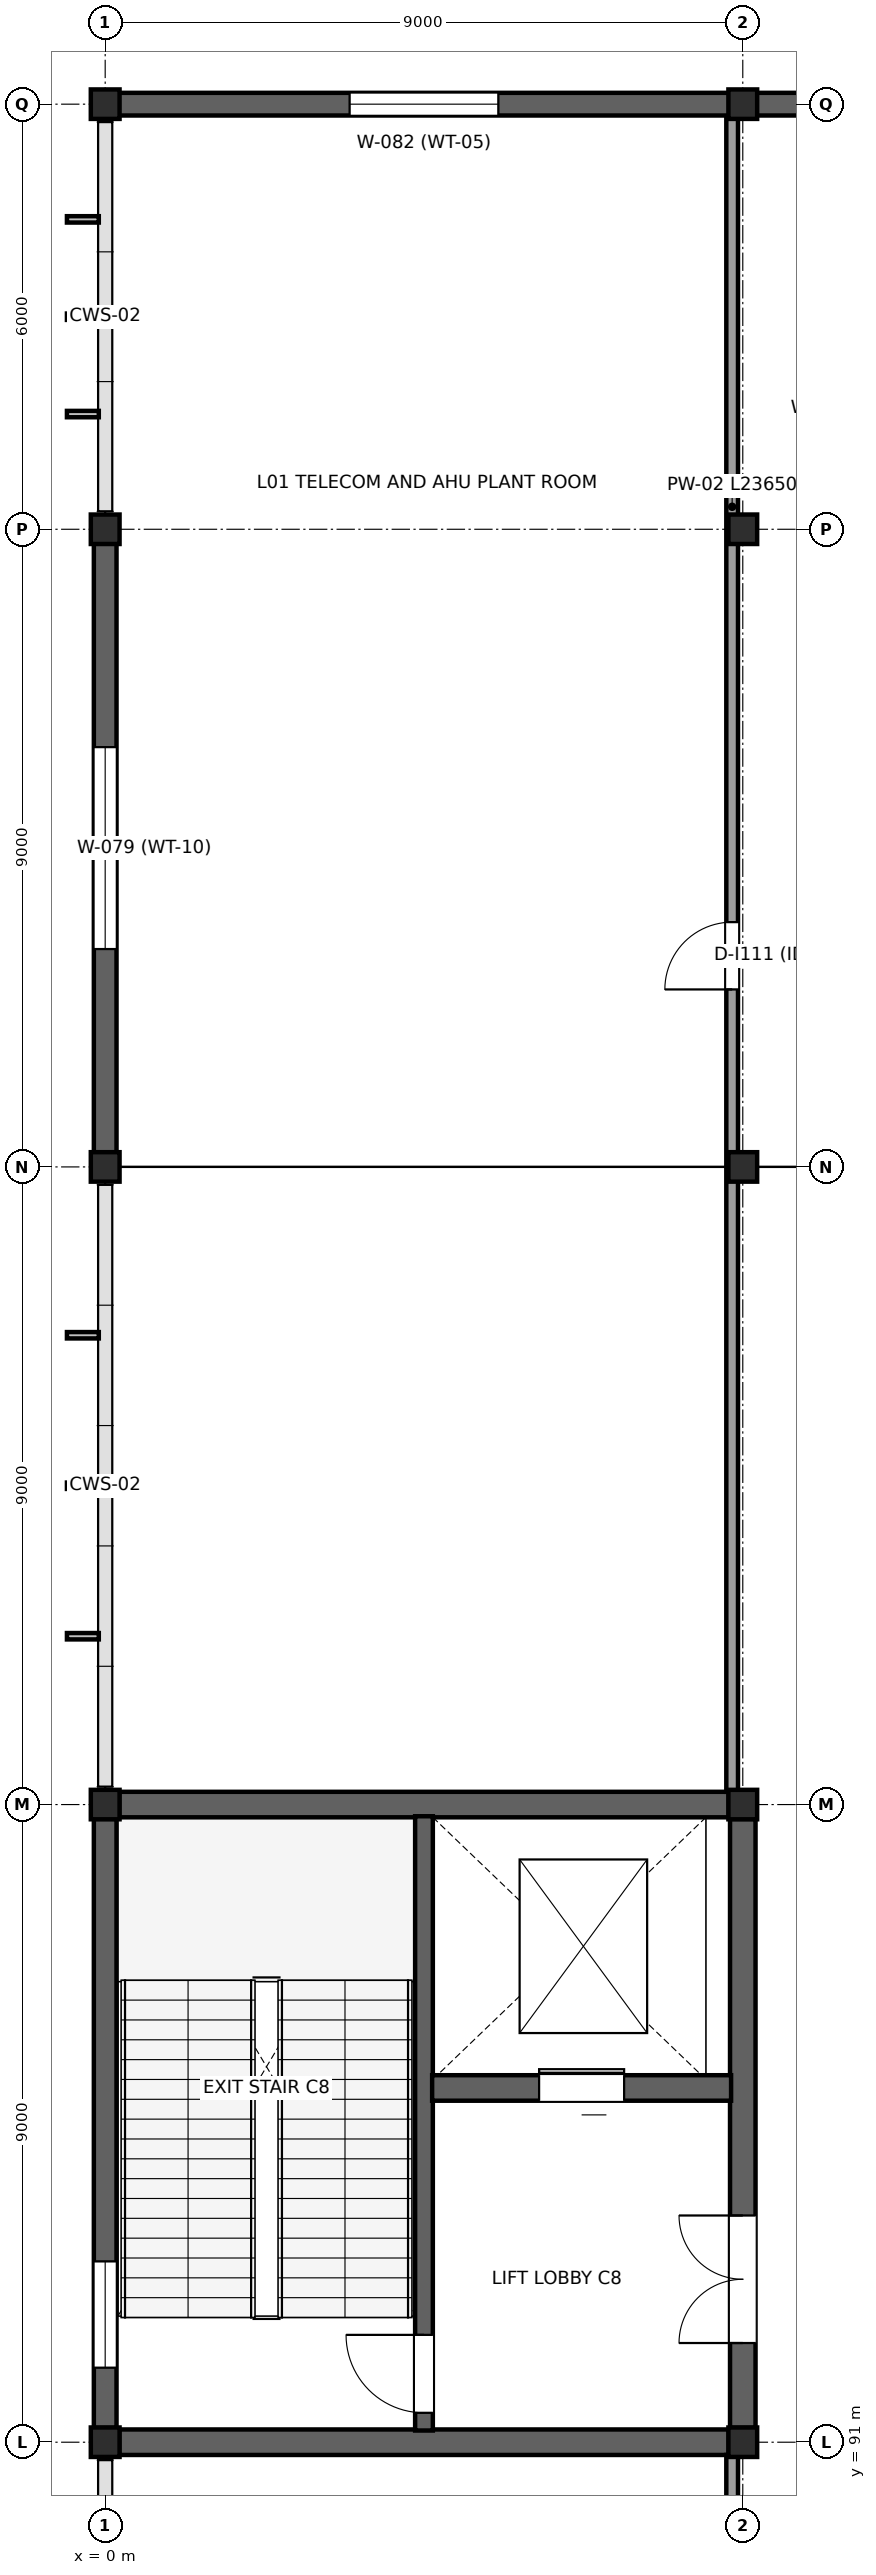
"""IFC4 building model, lengths in metres.
Left out: names, types, materials, properties, quantities, classifications, styles, units other than length and angle.
Written with IfcOpenShell. Run it as: python <this file> out.ifc"""

import sys

from ifc_helpers import new_model, si_unit, direction, frame, frame_2d, origin, origin_2d, place, context, subcontext, project, spatial, rectangle, i_section, extrude, element, fill, save


model = new_model("IFC4")
c1 = context("Model", 3, precision=1e-05, world=origin(), true_north=direction((0.0, 1.0)))
c2 = subcontext(c1, "Body", "Model", "MODEL_VIEW")
j1 = project(units=[si_unit("LENGTHUNIT", "METRE"), si_unit("PLANEANGLEUNIT", "RADIAN")], contexts=[c1])
p1 = place(None, origin())
s1 = spatial("IfcSite", under=j1, at=p1, CompositionType="ELEMENT")
p2 = place(p1, origin())
s2 = spatial("IfcBuilding", under=s1, at=p2, CompositionType="ELEMENT")
p3 = place(p2, frame((0.0, 0.0, 6.0)))
s3 = spatial("IfcBuildingStorey", under=s2, at=p3, CompositionType="ELEMENT", Elevation=6.0)
for number, where, z_axis, x_axis in (
    (1, (0.0, 91.0, 0.0), (0.0, 0.0, 1.0), (1.0, 0.0, 0.0)),
    (2, (0.0, 100.0, 0.0), (0.0, 0.0, 1.0), (1.0, 0.0, 0.0)),
    (3, (0.0, 109.0, 0.0), (0.0, 0.0, 1.0), (1.0, 0.0, 0.0)),
    (4, (0.0, 118.0, 0.0), (0.0, 0.0, 1.0), (1.0, 0.0, 0.0)),
    (5, (0.0, 124.0, 0.0), (0.0, 0.0, 1.0), (1.0, 0.0, 0.0)),
    (6, (9.0, 91.0, 0.0), (0.0, 0.0, 1.0), (1.0, 0.0, 0.0)),
    (7, (9.0, 100.0, 0.0), (0.0, 0.0, 1.0), (1.0, 0.0, 0.0)),
    (8, (9.0, 109.0, 0.0), (0.0, 0.0, 1.0), (1.0, 0.0, 0.0)),
    (9, (9.0, 118.0, 0.0), (0.0, 0.0, 1.0), (1.0, 0.0, 0.0)),
    (10, (9.0, 124.0, 0.0), (0.0, 0.0, 1.0), (1.0, 0.0, 0.0)),
):
    element("IfcColumn", number, at=place(p3, frame(where, z_axis=z_axis, x_axis=x_axis)), inside=s3, PredefinedType="COLUMN", context=c2, shape_type="SweptSolid", body=[
        extrude(i_section(OverallWidth=0.406, OverallDepth=0.416, WebThickness=0.03, FlangeThickness=0.048, at=origin_2d()), origin(), (0.0, 0.0, 1.0), 6.0),
    ])
p4 = place(p3, frame((0.0, 91.202, 0.0), z_axis=(0.0, 0.0, 1.0), x_axis=(0.0, 1.0, 0.0)))
e11 = element("IfcWall", 11, at=p4, inside=s3, PredefinedType="STANDARD", context=c2, shape_type="SweptSolid", body=[
    extrude(rectangle(XDim=8.596, YDim=0.32, at=frame_2d((4.298, 0.0))), origin(), (0.0, 0.0, 1.0), 5.78),
])
p5 = place(p4, frame((0.85, 0.0, 1.1)))
e12 = element("IfcOpeningElement", 12, at=p5, cuts=e11, PredefinedType="OPENING", context=c2, shape_type="SweptSolid", body=[
    extrude(rectangle(XDim=1.5, YDim=1.8, at=frame_2d((0.75, 0.9))), frame((0.0, 0.17, 0.0), z_axis=(0.0, -1.0, 0.0), x_axis=(1.0, 0.0, 0.0)), (0.0, 0.0, 1.0), 0.34),
])
p6 = place(p3, frame((0.0, 109.202, 0.0), z_axis=(0.0, 0.0, 1.0), x_axis=(0.0, 1.0, 0.0)))
e13 = element("IfcWall", 13, at=p6, inside=s3, PredefinedType="STANDARD", context=c2, shape_type="SweptSolid", body=[
    extrude(rectangle(XDim=8.596, YDim=0.32, at=frame_2d((4.298, 0.0))), origin(), (0.0, 0.0, 1.0), 5.78),
])
p7 = place(p6, frame((2.873, 0.0, 1.0)))
e14 = element("IfcOpeningElement", 14, at=p7, cuts=e13, PredefinedType="OPENING", context=c2, shape_type="SweptSolid", body=[
    extrude(rectangle(XDim=2.85, YDim=2.4, at=frame_2d((1.425, 1.2))), frame((0.0, 0.17, 0.0), z_axis=(0.0, -1.0, 0.0), x_axis=(1.0, 0.0, 0.0)), (0.0, 0.0, 1.0), 0.34),
])
p8 = place(p3, frame((0.022, 124.0, 0.0), z_axis=(0.0, 0.0, 1.0), x_axis=(1.0, 0.0, 0.0)))
e15 = element("IfcWall", 15, at=p8, inside=s3, PredefinedType="STANDARD", context=c2, shape_type="SweptSolid", body=[
    extrude(rectangle(XDim=8.956, YDim=0.32, at=frame_2d((4.478, 0.0))), origin(), (0.0, 0.0, 1.0), 5.78),
])
p9 = place(p8, frame((3.428, 0.0, 1.0)))
e16 = element("IfcOpeningElement", 16, at=p9, cuts=e15, PredefinedType="OPENING", context=c2, shape_type="SweptSolid", body=[
    extrude(rectangle(XDim=2.1, YDim=2.25, at=frame_2d((1.05, 1.125))), frame((0.0, 0.17, 0.0), z_axis=(0.0, -1.0, 0.0), x_axis=(1.0, 0.0, 0.0)), (0.0, 0.0, 1.0), 0.34),
])
p10 = place(p3, frame((9.022, 124.0, 0.0), z_axis=(0.0, 0.0, 1.0), x_axis=(1.0, 0.0, 0.0)))
e17 = element("IfcWall", 17, at=p10, inside=s3, PredefinedType="STANDARD", context=c2, shape_type="SweptSolid", body=[
    extrude(rectangle(XDim=8.956, YDim=0.32, at=frame_2d((4.478, 0.0))), origin(), (0.0, 0.0, 1.0), 5.78),
])
p11 = place(p10, frame((3.428, 0.0, 1.0)))
e18 = element("IfcOpeningElement", 18, at=p11, cuts=e17, PredefinedType="OPENING", context=c2, shape_type="SweptSolid", body=[
    extrude(rectangle(XDim=2.1, YDim=2.25, at=frame_2d((1.05, 1.125))), frame((0.0, 0.17, 0.0), z_axis=(0.0, -1.0, 0.0), x_axis=(1.0, 0.0, 0.0)), (0.0, 0.0, 1.0), 0.34),
])
p12 = place(p3, frame((9.0, 91.203, 0.0), z_axis=(0.0, 0.0, 1.0), x_axis=(0.0, 1.0, 0.0)))
e19 = element("IfcWall", 19, at=p12, inside=s3, PredefinedType="SHEAR", context=c2, shape_type="SweptSolid", body=[
    extrude(rectangle(XDim=8.594, YDim=0.36, at=frame_2d((4.297, 0.0))), origin(), (0.0, 0.0, 1.0), 5.78),
])
p13 = place(p12, frame((1.197, 0.0, 0.0)))
e20 = element("IfcOpeningElement", 20, at=p13, cuts=e19, PredefinedType="OPENING", context=c2, shape_type="SweptSolid", body=[
    extrude(rectangle(XDim=1.8, YDim=2.3, at=frame_2d((0.9, 1.15))), frame((0.0, 0.19, 0.0), z_axis=(0.0, -1.0, 0.0), x_axis=(1.0, 0.0, 0.0)), (0.0, 0.0, 1.0), 0.38),
])
for number, where, z_axis, x_axis in (
    (21, (0.198, 91.0, 0.0), (0.0, 0.0, 1.0), (1.0, 0.0, 0.0)),
    (22, (0.198, 100.0, 0.0), (0.0, 0.0, 1.0), (1.0, 0.0, 0.0)),
):
    element("IfcWall", number, at=place(p3, frame(where, z_axis=z_axis, x_axis=x_axis)), inside=s3, PredefinedType="SHEAR", context=c2, shape_type="SweptSolid", body=[
        extrude(rectangle(XDim=8.604, YDim=0.36, at=frame_2d((4.302, 0.0))), origin(), (0.0, 0.0, 1.0), 5.78),
    ])
p14 = place(p3, frame((4.5, 91.165, 0.0), z_axis=(0.0, 0.0, 1.0), x_axis=(0.0, 1.0, 0.0)))
e23 = element("IfcWall", 23, at=p14, inside=s3, PredefinedType="SHEAR", context=c2, shape_type="SweptSolid", body=[
    extrude(rectangle(XDim=8.67, YDim=0.25, at=frame_2d((4.335, 0.0))), origin(), (0.0, 0.0, 1.0), 5.78),
])
p15 = place(p14, frame((0.25, 0.0, 0.0)))
e24 = element("IfcOpeningElement", 24, at=p15, cuts=e23, PredefinedType="OPENING", context=c2, shape_type="SweptSolid", body=[
    extrude(rectangle(XDim=1.1, YDim=2.2, at=frame_2d((0.55, 1.1))), frame((0.0, 0.135, 0.0), z_axis=(0.0, -1.0, 0.0), x_axis=(1.0, 0.0, 0.0)), (0.0, 0.0, 1.0), 0.27),
])
p16 = place(p3, frame((4.615, 96.0, 0.0), z_axis=(0.0, 0.0, 1.0), x_axis=(1.0, 0.0, 0.0)))
e25 = element("IfcWall", 25, at=p16, inside=s3, PredefinedType="SHEAR", context=c2, shape_type="SweptSolid", body=[
    extrude(rectangle(XDim=4.22, YDim=0.36, at=frame_2d((2.11, 0.0))), origin(), (0.0, 0.0, 1.0), 5.78),
])
p17 = place(p16, frame((1.51, 0.0, 0.0)))
e26 = element("IfcOpeningElement", 26, at=p17, cuts=e25, PredefinedType="OPENING", context=c2, shape_type="SweptSolid", body=[
    extrude(rectangle(XDim=1.2, YDim=2.3, at=frame_2d((0.6, 1.15))), frame((0.0, 0.19, 0.0), z_axis=(0.0, -1.0, 0.0), x_axis=(1.0, 0.0, 0.0)), (0.0, 0.0, 1.0), 0.38),
])
p18 = place(p3, frame((8.85, 63.78, 0.0), z_axis=(0.0, 0.0, 1.0), x_axis=(0.0, 1.0, 0.0)))
e27 = element("IfcWall", 27, at=p18, inside=s3, PredefinedType="PARTITIONING", context=c2, shape_type="SweptSolid", body=[
    extrude(rectangle(XDim=27.04, YDim=0.165, at=frame_2d((13.52, 0.0))), origin(), (0.0, 0.0, 1.0), 4.55),
])
p19 = place(p18, frame((2.72, 0.0, 0.0)))
e28 = element("IfcOpeningElement", 28, at=p19, cuts=e27, PredefinedType="OPENING", context=c2, shape_type="SweptSolid", body=[
    extrude(rectangle(XDim=0.98, YDim=2.15, at=frame_2d((0.49, 1.075))), frame((0.0, 0.093, 0.0), z_axis=(0.0, -1.0, 0.0), x_axis=(1.0, 0.0, 0.0)), (0.0, 0.0, 1.0), 0.185),
])
p20 = place(p18, frame((9.72, 0.0, 0.0)))
e29 = element("IfcOpeningElement", 29, at=p20, cuts=e27, PredefinedType="OPENING", context=c2, shape_type="SweptSolid", body=[
    extrude(rectangle(XDim=1.02, YDim=2.16, at=frame_2d((0.51, 1.08))), frame((0.0, 0.093, 0.0), z_axis=(0.0, -1.0, 0.0), x_axis=(1.0, 0.0, 0.0)), (0.0, 0.0, 1.0), 0.185),
])
p21 = place(p18, frame((14.72, 0.0, 0.0)))
e30 = element("IfcOpeningElement", 30, at=p21, cuts=e27, PredefinedType="OPENING", context=c2, shape_type="SweptSolid", body=[
    extrude(rectangle(XDim=0.95, YDim=2.12, at=frame_2d((0.475, 1.06))), frame((0.0, 0.093, 0.0), z_axis=(0.0, -1.0, 0.0), x_axis=(1.0, 0.0, 0.0)), (0.0, 0.0, 1.0), 0.185),
])
p22 = place(p3, frame((8.85, 100.18, 0.0), z_axis=(0.0, 0.0, 1.0), x_axis=(0.0, 1.0, 0.0)))
e31 = element("IfcWall", 31, at=p22, inside=s3, PredefinedType="PARTITIONING", context=c2, shape_type="SweptSolid", body=[
    extrude(rectangle(XDim=23.65, YDim=0.165, at=frame_2d((11.825, 0.0))), origin(), (0.0, 0.0, 1.0), 4.55),
])
p23 = place(p22, frame((11.325, 0.0, 0.0)))
e32 = element("IfcOpeningElement", 32, at=p23, cuts=e31, PredefinedType="OPENING", context=c2, shape_type="SweptSolid", body=[
    extrude(rectangle(XDim=0.95, YDim=2.12, at=frame_2d((0.475, 1.06))), frame((0.0, 0.093, 0.0), z_axis=(0.0, -1.0, 0.0), x_axis=(1.0, 0.0, 0.0)), (0.0, 0.0, 1.0), 0.185),
])
p24 = place(p5, origin())
e33 = element("IfcWindow", 33, at=p24, inside=s3, PartitioningType="SINGLE_PANEL", PredefinedType="WINDOW", context=c2, shape_type="SweptSolid", body=[
    extrude(rectangle(XDim=1.5, YDim=1.8, at=frame_2d((0.75, 0.9))), frame((0.0, 0.03, 0.0), z_axis=(0.0, -1.0, 0.0), x_axis=(1.0, 0.0, 0.0)), (0.0, 0.0, 1.0), 0.06),
])
fill(e12, e33)
p25 = place(p7, origin())
e34 = element("IfcWindow", 34, at=p25, inside=s3, PartitioningType="SINGLE_PANEL", PredefinedType="WINDOW", context=c2, shape_type="SweptSolid", body=[
    extrude(rectangle(XDim=2.85, YDim=2.4, at=frame_2d((1.425, 1.2))), frame((0.0, 0.03, 0.0), z_axis=(0.0, -1.0, 0.0), x_axis=(1.0, 0.0, 0.0)), (0.0, 0.0, 1.0), 0.06),
])
fill(e14, e34)
p26 = place(p9, origin())
e35 = element("IfcWindow", 35, at=p26, inside=s3, PartitioningType="SINGLE_PANEL", PredefinedType="WINDOW", context=c2, shape_type="SweptSolid", body=[
    extrude(rectangle(XDim=2.1, YDim=2.25, at=frame_2d((1.05, 1.125))), frame((0.0, 0.03, 0.0), z_axis=(0.0, -1.0, 0.0), x_axis=(1.0, 0.0, 0.0)), (0.0, 0.0, 1.0), 0.06),
])
fill(e16, e35)
p27 = place(p15, origin())
e36 = element("IfcDoor", 36, at=p27, inside=s3, OperationType="SINGLE_SWING_RIGHT", PredefinedType="DOOR", context=c2, shape_type="SweptSolid", body=[
    extrude(rectangle(XDim=1.1, YDim=2.2, at=frame_2d((0.55, 1.1))), frame((0.0, 0.025, 0.0), z_axis=(0.0, -1.0, 0.0), x_axis=(1.0, 0.0, 0.0)), (0.0, 0.0, 1.0), 0.05),
])
fill(e24, e36)
p28 = place(p17, origin())
e37 = element("IfcDoor", 37, at=p28, inside=s3, OperationType="SLIDING_TO_RIGHT", PredefinedType="DOOR", context=c2, shape_type="SweptSolid", body=[
    extrude(rectangle(XDim=1.2, YDim=2.3, at=frame_2d((0.6, 1.15))), frame((0.0, 0.025, 0.0), z_axis=(0.0, -1.0, 0.0), x_axis=(1.0, 0.0, 0.0)), (0.0, 0.0, 1.0), 0.05),
])
fill(e26, e37)
p29 = place(p13, origin())
e38 = element("IfcDoor", 38, at=p29, inside=s3, OperationType="DOUBLE_DOOR_SINGLE_SWING", PredefinedType="DOOR", context=c2, shape_type="SweptSolid", body=[
    extrude(rectangle(XDim=1.8, YDim=2.3, at=frame_2d((0.9, 1.15))), frame((0.0, 0.025, 0.0), z_axis=(0.0, -1.0, 0.0), x_axis=(1.0, 0.0, 0.0)), (0.0, 0.0, 1.0), 0.05),
])
fill(e20, e38)
p30 = place(p23, origin())
e39 = element("IfcDoor", 39, at=p30, inside=s3, OperationType="SINGLE_SWING_LEFT", PredefinedType="DOOR", context=c2, shape_type="SweptSolid", body=[
    extrude(rectangle(XDim=0.95, YDim=2.12, at=frame_2d((0.475, 1.06))), frame((0.0, 0.025, 0.0), z_axis=(0.0, -1.0, 0.0), x_axis=(1.0, 0.0, 0.0)), (0.0, 0.0, 1.0), 0.05),
])
fill(e32, e39)
save(model, sys.argv[1])
